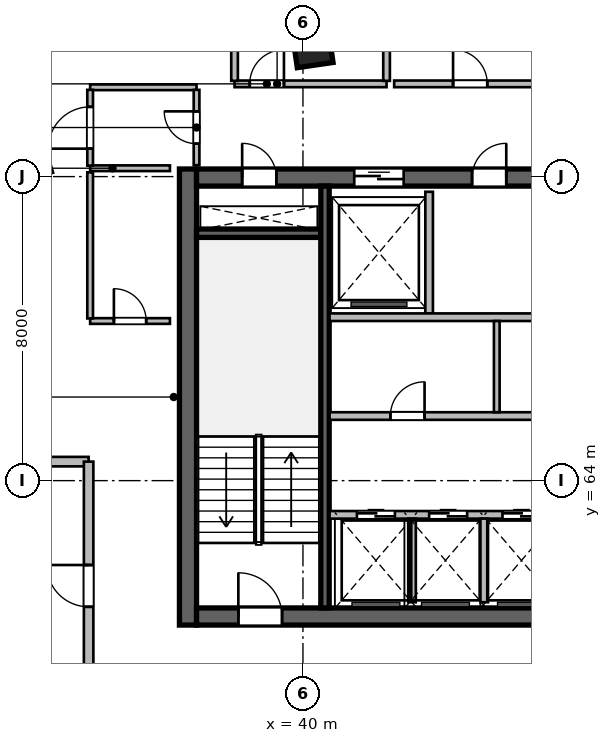
"""IFC4 building model, lengths in metres.
Left out: names, types, materials, properties, quantities, classifications, styles, units other than length and angle.
Written with IfcOpenShell. Run it as: python <this file> out.ifc"""

import sys

from ifc_helpers import new_model, si_unit, direction, frame, frame_2d, origin, origin_2d, place, context, subcontext, project, spatial, rectangle, extrude, source, transform, mapped, element, fill, save


model = new_model("IFC4")
c1 = context("Model", 3, precision=1e-05, world=origin(), true_north=direction((0.0, 1.0)))
c2 = subcontext(c1, "Body", "Model", "MODEL_VIEW")
j1 = project(units=[si_unit("LENGTHUNIT", "METRE"), si_unit("PLANEANGLEUNIT", "RADIAN")], contexts=[c1])
p1 = place(None, origin())
s1 = spatial("IfcSite", under=j1, at=p1, CompositionType="ELEMENT")
p2 = place(p1, origin())
s2 = spatial("IfcBuilding", under=s1, at=p2, CompositionType="ELEMENT")
p3 = place(p2, frame((0.0, 0.0, 231.3)))
s3 = spatial("IfcBuildingStorey", under=s2, at=p3, CompositionType="ELEMENT", Elevation=231.3)
m1 = source(origin(), c2, "Body", "SweptSolid", [
    extrude(rectangle(XDim=12.0, YDim=0.45, at=frame_2d((6.0, 0.0))), origin(), (0.0, 0.0, 1.0), 3.9),
])
p4 = place(p3, frame((36.975, 60.2, 0.0), z_axis=(0.0, 0.0, 1.0), x_axis=(0.0, 1.0, 0.0)))
e1 = element("IfcWall", 1, at=p4, inside=s3, PredefinedType="SHEAR", context=c2, shape_type="MappedRepresentation", body=[
    mapped(m1, transform((0.0, 0.0, 0.0), scale=1.0)),
])
m2 = source(origin(), c2, "Body", "SweptSolid", [
    extrude(rectangle(XDim=21.6, YDim=0.45, at=frame_2d((10.8, 0.0))), origin(), (0.0, 0.0, 1.0), 3.9),
])
p5 = place(p3, frame((37.2, 60.425, 0.0), z_axis=(0.0, 0.0, 1.0), x_axis=(1.0, 0.0, 0.0)))
e2 = element("IfcWall", 2, at=p5, inside=s3, PredefinedType="SHEAR", context=c2, shape_type="MappedRepresentation", body=[
    mapped(m2, transform((0.0, 0.0, 0.0), scale=1.0)),
])
p6 = place(p5, frame((1.1, 0.0, 0.0)))
e3 = element("IfcOpeningElement", 3, at=p6, cuts=e2, PredefinedType="OPENING", context=c2, shape_type="SweptSolid", body=[
    extrude(rectangle(XDim=1.15, YDim=2.15, at=frame_2d((0.575, 1.075))), frame((0.0, 0.235, 0.0), z_axis=(0.0, -1.0, 0.0), x_axis=(1.0, 0.0, 0.0)), (0.0, 0.0, 1.0), 0.47),
])
p7 = place(p5, frame((19.5, 0.0, 0.0)))
e4 = element("IfcOpeningElement", 4, at=p7, cuts=e2, PredefinedType="OPENING", context=c2, shape_type="SweptSolid", body=[
    extrude(rectangle(XDim=0.9, YDim=2.1, at=frame_2d((0.45, 1.05))), frame((0.0, 0.235, 0.0), z_axis=(0.0, -1.0, 0.0), x_axis=(1.0, 0.0, 0.0)), (0.0, 0.0, 1.0), 0.47),
])
p8 = place(p5, frame((12.02, 0.0, 0.0)))
e5 = element("IfcOpeningElement", 5, at=p8, cuts=e2, PredefinedType="OPENING", context=c2, shape_type="SweptSolid", body=[
    extrude(rectangle(XDim=1.6, YDim=2.15, at=frame_2d((0.8, 1.075))), frame((0.0, 0.235, 0.0), z_axis=(0.0, -1.0, 0.0), x_axis=(1.0, 0.0, 0.0)), (0.0, 0.0, 1.0), 0.47),
])
p9 = place(p3, frame((37.2, 71.975, 0.0), z_axis=(0.0, 0.0, 1.0), x_axis=(1.0, 0.0, 0.0)))
e6 = element("IfcWall", 6, at=p9, inside=s3, PredefinedType="SHEAR", context=c2, shape_type="MappedRepresentation", body=[
    mapped(m2, transform((0.0, 0.0, 0.0), scale=1.0)),
])
p10 = place(p9, frame((1.2, 0.0, 0.0)))
e7 = element("IfcOpeningElement", 7, at=p10, cuts=e6, PredefinedType="OPENING", context=c2, shape_type="SweptSolid", body=[
    extrude(rectangle(XDim=0.9, YDim=2.1, at=frame_2d((0.45, 1.05))), frame((0.0, 0.235, 0.0), z_axis=(0.0, -1.0, 0.0), x_axis=(1.0, 0.0, 0.0)), (0.0, 0.0, 1.0), 0.47),
])
p11 = place(p9, frame((14.7, 0.0, 0.0)))
e8 = element("IfcOpeningElement", 8, at=p11, cuts=e6, PredefinedType="OPENING", context=c2, shape_type="SweptSolid", body=[
    extrude(rectangle(XDim=1.2, YDim=2.15, at=frame_2d((0.6, 1.075))), frame((0.0, 0.235, 0.0), z_axis=(0.0, -1.0, 0.0), x_axis=(1.0, 0.0, 0.0)), (0.0, 0.0, 1.0), 0.47),
])
p12 = place(p9, frame((4.15, 0.0, 0.0)))
e9 = element("IfcOpeningElement", 9, at=p12, cuts=e6, PredefinedType="OPENING", context=c2, shape_type="SweptSolid", body=[
    extrude(rectangle(XDim=1.3, YDim=2.15, at=frame_2d((0.65, 1.075))), frame((0.0, 0.235, 0.0), z_axis=(0.0, -1.0, 0.0), x_axis=(1.0, 0.0, 0.0)), (0.0, 0.0, 1.0), 0.47),
])
p13 = place(p9, frame((7.25, 0.0, 0.0)))
e10 = element("IfcOpeningElement", 10, at=p13, cuts=e6, PredefinedType="OPENING", context=c2, shape_type="SweptSolid", body=[
    extrude(rectangle(XDim=0.9, YDim=2.1, at=frame_2d((0.45, 1.05))), frame((0.0, 0.235, 0.0), z_axis=(0.0, -1.0, 0.0), x_axis=(1.0, 0.0, 0.0)), (0.0, 0.0, 1.0), 0.47),
])
p14 = place(p9, frame((10.95, 0.0, 0.0)))
e11 = element("IfcOpeningElement", 11, at=p14, cuts=e6, PredefinedType="OPENING", context=c2, shape_type="SweptSolid", body=[
    extrude(rectangle(XDim=0.9, YDim=2.1, at=frame_2d((0.45, 1.05))), frame((0.0, 0.235, 0.0), z_axis=(0.0, -1.0, 0.0), x_axis=(1.0, 0.0, 0.0)), (0.0, 0.0, 1.0), 0.47),
])
m3 = source(origin(), c2, "Body", "SweptSolid", [
    extrude(rectangle(XDim=3.27, YDim=0.22, at=frame_2d((1.635, 0.0))), origin(), (0.0, 0.0, 1.0), 3.9),
])
p15 = place(p3, frame((37.2, 70.51, 0.0), z_axis=(0.0, 0.0, 1.0), x_axis=(1.0, 0.0, 0.0)))
e12 = element("IfcWall", 12, at=p15, inside=s3, PredefinedType="SHEAR", context=c2, shape_type="MappedRepresentation", body=[
    mapped(m3, transform((0.0, 0.0, 0.0), scale=1.0)),
])
m4 = source(origin(), c2, "Body", "SweptSolid", [
    extrude(rectangle(XDim=11.1, YDim=0.22, at=frame_2d((5.55, 0.0))), origin(), (0.0, 0.0, 1.0), 3.9),
])
p16 = place(p3, frame((40.58, 60.65, 0.0), z_axis=(0.0, 0.0, 1.0), x_axis=(0.0, 1.0, 0.0)))
e13 = element("IfcWall", 13, at=p16, inside=s3, PredefinedType="SHEAR", context=c2, shape_type="MappedRepresentation", body=[
    mapped(m4, transform((0.0, 0.0, 0.0), scale=1.0)),
])
m5 = source(origin(), c2, "Body", "SweptSolid", [
    extrude(rectangle(XDim=0.95, YDim=0.95, at=origin_2d()), origin(), (0.0, 0.0, 1.0), 3.9),
])
p17 = place(p3, frame((40.253, 75.404, 0.0), z_axis=(0.0, 0.0, 1.0), x_axis=(-0.143492621991, 0.98965138682, 0.0)))
e14 = element("IfcColumn", 14, at=p17, inside=s3, PredefinedType="COLUMN", context=c2, shape_type="MappedRepresentation", body=[
    mapped(m5, transform((0.0, 0.0, 0.0), scale=1.0)),
])
m6 = source(origin(), c2, "Body", "SweptSolid", [
    extrude(rectangle(XDim=3.2, YDim=0.2, at=frame_2d((1.6, 0.0))), origin(), (0.0, 0.0, 1.0), 3.65),
])
p18 = place(p3, frame((43.32, 68.4, 0.0), z_axis=(0.0, 0.0, 1.0), x_axis=(0.0, 1.0, 0.0)))
e15 = element("IfcWall", 15, at=p18, inside=s3, PredefinedType="SOLIDWALL", context=c2, shape_type="MappedRepresentation", body=[
    mapped(m6, transform((0.0, 0.0, 0.0), scale=1.0)),
])
m7 = source(origin(), c2, "Body", "SweptSolid", [
    extrude(rectangle(XDim=8.8, YDim=0.2, at=frame_2d((4.4, 0.0))), origin(), (0.0, 0.0, 1.0), 3.65),
])
p19 = place(p3, frame((40.7, 68.3, 0.0), z_axis=(0.0, 0.0, 1.0), x_axis=(1.0, 0.0, 0.0)))
e16 = element("IfcWall", 16, at=p19, inside=s3, PredefinedType="SOLIDWALL", context=c2, shape_type="MappedRepresentation", body=[
    mapped(m7, transform((0.0, 0.0, 0.0), scale=1.0)),
])
m8 = source(origin(), c2, "Body", "SweptSolid", [
    extrude(rectangle(XDim=8.02, YDim=0.2, at=frame_2d((4.01, 0.0))), origin(), (0.0, 0.0, 1.0), 3.65),
])
p20 = place(p3, frame((40.7, 63.1, 0.0), z_axis=(0.0, 0.0, 1.0), x_axis=(1.0, 0.0, 0.0)))
e17 = element("IfcWall", 17, at=p20, inside=s3, PredefinedType="SOLIDWALL", context=c2, shape_type="MappedRepresentation", body=[
    mapped(m8, transform((0.0, 0.0, 0.0), scale=1.0)),
])
p21 = place(p20, frame((0.72, 0.0, 0.0)))
e18 = element("IfcOpeningElement", 18, at=p21, cuts=e17, PredefinedType="OPENING", context=c2, shape_type="SweptSolid", body=[
    extrude(rectangle(XDim=1.0, YDim=2.15, at=frame_2d((0.5, 1.075))), frame((0.0, 0.11, 0.0), z_axis=(0.0, -1.0, 0.0), x_axis=(1.0, 0.0, 0.0)), (0.0, 0.0, 1.0), 0.22),
])
p22 = place(p20, frame((2.62, 0.0, 0.0)))
e19 = element("IfcOpeningElement", 19, at=p22, cuts=e17, PredefinedType="OPENING", context=c2, shape_type="SweptSolid", body=[
    extrude(rectangle(XDim=1.0, YDim=2.15, at=frame_2d((0.5, 1.075))), frame((0.0, 0.11, 0.0), z_axis=(0.0, -1.0, 0.0), x_axis=(1.0, 0.0, 0.0)), (0.0, 0.0, 1.0), 0.22),
])
p23 = place(p20, frame((4.55, 0.0, 0.0)))
e20 = element("IfcOpeningElement", 20, at=p23, cuts=e17, PredefinedType="OPENING", context=c2, shape_type="SweptSolid", body=[
    extrude(rectangle(XDim=1.0, YDim=2.15, at=frame_2d((0.5, 1.075))), frame((0.0, 0.11, 0.0), z_axis=(0.0, -1.0, 0.0), x_axis=(1.0, 0.0, 0.0)), (0.0, 0.0, 1.0), 0.22),
])
p24 = place(p20, frame((6.55, 0.0, 0.0)))
e21 = element("IfcOpeningElement", 21, at=p24, cuts=e17, PredefinedType="OPENING", context=c2, shape_type="SweptSolid", body=[
    extrude(rectangle(XDim=1.0, YDim=2.15, at=frame_2d((0.5, 1.075))), frame((0.0, 0.11, 0.0), z_axis=(0.0, -1.0, 0.0), x_axis=(1.0, 0.0, 0.0)), (0.0, 0.0, 1.0), 0.22),
])
m9 = source(origin(), c2, "Body", "SweptSolid", [
    extrude(rectangle(XDim=2.2, YDim=0.2, at=frame_2d((1.1, 0.0))), origin(), (0.0, 0.0, 1.0), 3.65),
])
for number, where, z_axis, x_axis in (
    (22, (42.87, 60.8, 0.0), (0.0, 0.0, 1.0), (0.0, 1.0, 0.0)),
    (23, (44.77, 60.8, 0.0), (0.0, 0.0, 1.0), (0.0, 1.0, 0.0)),
):
    element("IfcWall", number, at=place(p3, frame(where, z_axis=z_axis, x_axis=x_axis)), inside=s3, PredefinedType="SOLIDWALL", context=c2, shape_type="MappedRepresentation", body=[
        mapped(m9, transform((0.0, 0.0, 0.0), scale=1.0)),
    ])
p25 = place(p3, frame((40.7, 65.7, 0.0), z_axis=(0.0, 0.0, 1.0), x_axis=(1.0, 0.0, 0.0)))
e24 = element("IfcWall", 24, at=p25, inside=s3, PredefinedType="SOLIDWALL", context=c2, shape_type="MappedRepresentation", body=[
    mapped(m7, transform((0.0, 0.0, 0.0), scale=1.0)),
])
p26 = place(p25, frame((1.6, 0.0, 0.0)))
e25 = element("IfcOpeningElement", 25, at=p26, cuts=e24, PredefinedType="OPENING", context=c2, shape_type="SweptSolid", body=[
    extrude(rectangle(XDim=0.9, YDim=2.1, at=frame_2d((0.45, 1.05))), frame((0.0, 0.11, 0.0), z_axis=(0.0, -1.0, 0.0), x_axis=(1.0, 0.0, 0.0)), (0.0, 0.0, 1.0), 0.22),
])
p27 = place(p25, frame((6.1, 0.0, 0.0)))
e26 = element("IfcOpeningElement", 26, at=p27, cuts=e24, PredefinedType="OPENING", context=c2, shape_type="SweptSolid", body=[
    extrude(rectangle(XDim=0.9, YDim=2.1, at=frame_2d((0.45, 1.05))), frame((0.0, 0.11, 0.0), z_axis=(0.0, -1.0, 0.0), x_axis=(1.0, 0.0, 0.0)), (0.0, 0.0, 1.0), 0.22),
])
m10 = source(origin(), c2, "Body", "SweptSolid", [
    extrude(rectangle(XDim=2.4, YDim=0.15, at=frame_2d((1.2, 0.0))), origin(), (0.0, 0.0, 1.0), 3.65),
])
p28 = place(p3, frame((45.1, 65.8, 0.0), z_axis=(0.0, 0.0, 1.0), x_axis=(0.0, 1.0, 0.0)))
e27 = element("IfcWall", 27, at=p28, inside=s3, PredefinedType="PARTITIONING", context=c2, shape_type="MappedRepresentation", body=[
    mapped(m10, transform((0.0, 0.0, 0.0), scale=1.0)),
])
m11 = source(origin(), c2, "Body", "SweptSolid", [
    extrude(rectangle(XDim=2.1, YDim=0.15, at=frame_2d((1.05, 0.0))), origin(), (0.0, 0.0, 1.0), 3.65),
])
p29 = place(p3, frame((34.4, 72.22, 0.0), z_axis=(0.0, 0.0, 1.0), x_axis=(1.0, 0.0, 0.0)))
e28 = element("IfcWall", 28, at=p29, inside=s3, PredefinedType="PARTITIONING", context=c2, shape_type="MappedRepresentation", body=[
    mapped(m11, transform((0.0, 0.0, 0.0), scale=1.0)),
])
m12 = source(origin(), c2, "Body", "SweptSolid", [
    extrude(rectangle(XDim=2.8, YDim=0.15, at=frame_2d((1.4, 0.0))), origin(), (0.0, 0.0, 1.0), 3.65),
])
p30 = place(p3, frame((34.4, 74.35, 0.0), z_axis=(0.0, 0.0, 1.0), x_axis=(1.0, 0.0, 0.0)))
e29 = element("IfcWall", 29, at=p30, inside=s3, PredefinedType="PARTITIONING", context=c2, shape_type="MappedRepresentation", body=[
    mapped(m12, transform((0.0, 0.0, 0.0), scale=1.0)),
])
m13 = source(origin(), c2, "Body", "SweptSolid", [
    extrude(rectangle(XDim=1.995, YDim=0.15, at=frame_2d((0.998, 0.0))), origin(), (0.0, 0.0, 1.0), 3.65),
])
p31 = place(p3, frame((34.4, 72.288, 0.0), z_axis=(0.0, 0.0, 1.0), x_axis=(0.0, 1.0, 0.0)))
e30 = element("IfcWall", 30, at=p31, inside=s3, PredefinedType="PARTITIONING", context=c2, shape_type="MappedRepresentation", body=[
    mapped(m13, transform((0.0, 0.0, 0.0), scale=1.0)),
])
p32 = place(p31, frame((0.448, 0.0, 0.0)))
e31 = element("IfcOpeningElement", 31, at=p32, cuts=e30, PredefinedType="OPENING", context=c2, shape_type="SweptSolid", body=[
    extrude(rectangle(XDim=1.1, YDim=2.15, at=frame_2d((0.55, 1.075))), frame((0.0, 0.085, 0.0), z_axis=(0.0, -1.0, 0.0), x_axis=(1.0, 0.0, 0.0)), (0.0, 0.0, 1.0), 0.17),
])
m14 = source(origin(), c2, "Body", "SweptSolid", [
    extrude(rectangle(XDim=1.982, YDim=0.15, at=frame_2d((0.991, 0.0))), origin(), (0.0, 0.0, 1.0), 3.65),
])
p33 = place(p3, frame((37.2, 72.3, 0.0), z_axis=(0.0, 0.0, 1.0), x_axis=(0.0, 1.0, 0.0)))
e32 = element("IfcWall", 32, at=p33, inside=s3, PredefinedType="PARTITIONING", context=c2, shape_type="MappedRepresentation", body=[
    mapped(m14, transform((0.0, 0.0, 0.0), scale=1.0)),
])
p34 = place(p33, frame((0.566, 0.0, 0.0)))
e33 = element("IfcOpeningElement", 33, at=p34, cuts=e32, PredefinedType="OPENING", context=c2, shape_type="SweptSolid", body=[
    extrude(rectangle(XDim=0.85, YDim=2.1, at=frame_2d((0.425, 1.05))), frame((0.0, 0.085, 0.0), z_axis=(0.0, -1.0, 0.0), x_axis=(1.0, 0.0, 0.0)), (0.0, 0.0, 1.0), 0.17),
])
p35 = place(p3, frame((34.4, 68.2, 0.0), z_axis=(0.0, 0.0, 1.0), x_axis=(1.0, 0.0, 0.0)))
e34 = element("IfcWall", 34, at=p35, inside=s3, PredefinedType="PARTITIONING", context=c2, shape_type="MappedRepresentation", body=[
    mapped(m11, transform((0.0, 0.0, 0.0), scale=1.0)),
])
p36 = place(p35, frame((0.625, 0.0, 0.0)))
e35 = element("IfcOpeningElement", 35, at=p36, cuts=e34, PredefinedType="OPENING", context=c2, shape_type="SweptSolid", body=[
    extrude(rectangle(XDim=0.85, YDim=2.1, at=frame_2d((0.425, 1.05))), frame((0.0, 0.085, 0.0), z_axis=(0.0, -1.0, 0.0), x_axis=(1.0, 0.0, 0.0)), (0.0, 0.0, 1.0), 0.17),
])
m15 = source(origin(), c2, "Body", "SweptSolid", [
    extrude(rectangle(XDim=3.845, YDim=0.15, at=frame_2d((1.922, 0.0))), origin(), (0.0, 0.0, 1.0), 3.65),
])
p37 = place(p3, frame((34.4, 68.268, 0.0), z_axis=(0.0, 0.0, 1.0), x_axis=(0.0, 1.0, 0.0)))
e36 = element("IfcWall", 36, at=p37, inside=s3, PredefinedType="PARTITIONING", context=c2, shape_type="MappedRepresentation", body=[
    mapped(m15, transform((0.0, 0.0, 0.0), scale=1.0)),
])
m16 = source(origin(), c2, "Body", "SweptSolid", [
    extrude(rectangle(XDim=4.0, YDim=0.175, at=frame_2d((2.0, 0.0))), origin(), (0.0, 0.0, 1.0), 3.65),
])
p38 = place(p3, frame((38.2, 74.44, 0.0), z_axis=(0.0, 0.0, 1.0), x_axis=(1.0, 0.0, 0.0)))
e37 = element("IfcWall", 37, at=p38, inside=s3, PredefinedType="PARTITIONING", context=c2, shape_type="MappedRepresentation", body=[
    mapped(m16, transform((0.0, 0.0, 0.0), scale=1.0)),
])
p39 = place(p38, frame((0.4, 0.0, 0.0)))
e38 = element("IfcOpeningElement", 38, at=p39, cuts=e37, PredefinedType="OPENING", context=c2, shape_type="SweptSolid", body=[
    extrude(rectangle(XDim=0.9, YDim=2.08, at=frame_2d((0.45, 1.04))), frame((0.0, 0.098, 0.0), z_axis=(0.0, -1.0, 0.0), x_axis=(1.0, 0.0, 0.0)), (0.0, 0.0, 1.0), 0.195),
])
m17 = source(origin(), c2, "Body", "SweptSolid", [
    extrude(rectangle(XDim=2.403, YDim=0.175, at=frame_2d((1.201, 0.0))), origin(), (0.0, 0.0, 1.0), 3.65),
])
for number, where, z_axis, x_axis in (
    (39, (38.2, 74.519, 0.0), (0.0, 0.0, 1.0), (0.0, 1.0, 0.0)),
    (40, (42.2, 74.519, 0.0), (0.0, 0.0, 1.0), (0.0, 1.0, 0.0)),
):
    element("IfcWall", number, at=place(p3, frame(where, z_axis=z_axis, x_axis=x_axis)), inside=s3, PredefinedType="PARTITIONING", context=c2, shape_type="MappedRepresentation", body=[
        mapped(m17, transform((0.0, 0.0, 0.0), scale=1.0)),
    ])
p40 = place(p3, frame((42.4, 74.44, 0.0), z_axis=(0.0, 0.0, 1.0), x_axis=(1.0, 0.0, 0.0)))
e41 = element("IfcWall", 41, at=p40, inside=s3, PredefinedType="PARTITIONING", context=c2, shape_type="MappedRepresentation", body=[
    mapped(m16, transform((0.0, 0.0, 0.0), scale=1.0)),
])
p41 = place(p40, frame((1.55, 0.0, 0.0)))
e42 = element("IfcOpeningElement", 42, at=p41, cuts=e41, PredefinedType="OPENING", context=c2, shape_type="SweptSolid", body=[
    extrude(rectangle(XDim=0.9, YDim=2.08, at=frame_2d((0.45, 1.04))), frame((0.0, 0.098, 0.0), z_axis=(0.0, -1.0, 0.0), x_axis=(1.0, 0.0, 0.0)), (0.0, 0.0, 1.0), 0.195),
])
m18 = source(origin(), c2, "Body", "SweptSolid", [
    extrude(rectangle(XDim=15.25, YDim=0.25, at=frame_2d((7.625, 0.0))), origin(), (0.0, 0.0, 1.0), 3.65),
])
p42 = place(p3, frame((19.11, 64.5, 0.0), z_axis=(0.0, 0.0, 1.0), x_axis=(1.0, 0.0, 0.0)))
e43 = element("IfcWall", 43, at=p42, inside=s3, PredefinedType="PARTITIONING", context=c2, shape_type="MappedRepresentation", body=[
    mapped(m18, transform((0.0, 0.0, 0.0), scale=1.0)),
])
m19 = source(origin(), c2, "Body", "SweptSolid", [
    extrude(rectangle(XDim=6.54, YDim=0.25, at=frame_2d((3.27, 0.0))), origin(), (0.0, 0.0, 1.0), 3.65),
])
p43 = place(p3, frame((34.36, 57.96, 0.0), z_axis=(0.0, 0.0, 1.0), x_axis=(0.0, 1.0, 0.0)))
e44 = element("IfcWall", 44, at=p43, inside=s3, PredefinedType="PARTITIONING", context=c2, shape_type="MappedRepresentation", body=[
    mapped(m19, transform((0.0, 0.0, 0.0), scale=1.0)),
])
p44 = place(p43, frame((2.72, 0.0, 0.0)))
e45 = element("IfcOpeningElement", 45, at=p44, cuts=e44, PredefinedType="OPENING", context=c2, shape_type="SweptSolid", body=[
    extrude(rectangle(XDim=1.1, YDim=2.15, at=frame_2d((0.55, 1.075))), frame((0.0, 0.135, 0.0), z_axis=(0.0, -1.0, 0.0), x_axis=(1.0, 0.0, 0.0)), (0.0, 0.0, 1.0), 0.27),
])
m20 = source(origin(), c2, "Body", "SweptSolid", [
    extrude(rectangle(XDim=1.15, YDim=2.15, at=frame_2d((0.575, 1.075))), frame((0.0, 0.025, 0.0), z_axis=(0.0, -1.0, 0.0), x_axis=(1.0, 0.0, 0.0)), (0.0, 0.0, 1.0), 0.05),
])
p45 = place(p6, origin())
e46 = element("IfcDoor", 46, at=p45, inside=s3, OperationType="SINGLE_SWING_LEFT", PredefinedType="DOOR", context=c2, shape_type="MappedRepresentation", body=[
    mapped(m20, transform((0.0, 0.0, 0.0), scale=1.0)),
])
fill(e3, e46)
m21 = source(origin(), c2, "Body", "SweptSolid", [
    extrude(rectangle(XDim=0.9, YDim=2.1, at=frame_2d((0.45, 1.05))), frame((0.0, 0.025, 0.0), z_axis=(0.0, -1.0, 0.0), x_axis=(1.0, 0.0, 0.0)), (0.0, 0.0, 1.0), 0.05),
])
p46 = place(p10, origin())
e47 = element("IfcDoor", 47, at=p46, inside=s3, OperationType="SINGLE_SWING_LEFT", PredefinedType="DOOR", context=c2, shape_type="MappedRepresentation", body=[
    mapped(m21, transform((0.0, 0.0, 0.0), scale=1.0)),
])
fill(e7, e47)
m22 = source(origin(), c2, "Body", "SweptSolid", [
    extrude(rectangle(XDim=1.3, YDim=2.15, at=frame_2d((0.65, 1.075))), frame((0.0, 0.025, 0.0), z_axis=(0.0, -1.0, 0.0), x_axis=(1.0, 0.0, 0.0)), (0.0, 0.0, 1.0), 0.05),
])
p47 = place(p12, origin())
e48 = element("IfcDoor", 48, at=p47, inside=s3, OperationType="DOUBLE_DOOR_SLIDING", PredefinedType="DOOR", context=c2, shape_type="MappedRepresentation", body=[
    mapped(m22, transform((0.0, 0.0, 0.0), scale=1.0)),
])
fill(e9, e48)
p48 = place(p13, origin())
e49 = element("IfcDoor", 49, at=p48, inside=s3, OperationType="SINGLE_SWING_RIGHT", PredefinedType="DOOR", context=c2, shape_type="MappedRepresentation", body=[
    mapped(m21, transform((0.0, 0.0, 0.0), scale=1.0)),
])
fill(e10, e49)
m23 = source(origin(), c2, "Body", "SweptSolid", [
    extrude(rectangle(XDim=1.0, YDim=2.15, at=frame_2d((0.5, 1.075))), frame((0.0, 0.025, 0.0), z_axis=(0.0, -1.0, 0.0), x_axis=(1.0, 0.0, 0.0)), (0.0, 0.0, 1.0), 0.05),
])
p49 = place(p21, origin())
e50 = element("IfcDoor", 50, at=p49, inside=s3, OperationType="DOUBLE_DOOR_SLIDING", PredefinedType="DOOR", context=c2, shape_type="MappedRepresentation", body=[
    mapped(m23, transform((0.0, 0.0, 0.0), scale=1.0)),
])
fill(e18, e50)
p50 = place(p22, origin())
e51 = element("IfcDoor", 51, at=p50, inside=s3, OperationType="DOUBLE_DOOR_SLIDING", PredefinedType="DOOR", context=c2, shape_type="MappedRepresentation", body=[
    mapped(m23, transform((0.0, 0.0, 0.0), scale=1.0)),
])
fill(e19, e51)
p51 = place(p23, origin())
e52 = element("IfcDoor", 52, at=p51, inside=s3, OperationType="DOUBLE_DOOR_SLIDING", PredefinedType="DOOR", context=c2, shape_type="MappedRepresentation", body=[
    mapped(m23, transform((0.0, 0.0, 0.0), scale=1.0)),
])
fill(e20, e52)
p52 = place(p26, origin())
e53 = element("IfcDoor", 53, at=p52, inside=s3, OperationType="SINGLE_SWING_RIGHT", PredefinedType="DOOR", context=c2, shape_type="MappedRepresentation", body=[
    mapped(m21, transform((0.0, 0.0, 0.0), scale=1.0)),
])
fill(e25, e53)
m24 = source(origin(), c2, "Body", "SweptSolid", [
    extrude(rectangle(XDim=0.85, YDim=2.1, at=frame_2d((0.425, 1.05))), frame((0.0, 0.025, 0.0), z_axis=(0.0, -1.0, 0.0), x_axis=(1.0, 0.0, 0.0)), (0.0, 0.0, 1.0), 0.05),
])
p53 = place(p34, origin())
e54 = element("IfcDoor", 54, at=p53, inside=s3, OperationType="SINGLE_SWING_RIGHT", PredefinedType="DOOR", context=c2, shape_type="MappedRepresentation", body=[
    mapped(m24, transform((0.0, 0.0, 0.0), scale=1.0)),
])
fill(e33, e54)
p54 = place(p36, origin())
e55 = element("IfcDoor", 55, at=p54, inside=s3, OperationType="SINGLE_SWING_LEFT", PredefinedType="DOOR", context=c2, shape_type="MappedRepresentation", body=[
    mapped(m24, transform((0.0, 0.0, 0.0), scale=1.0)),
])
fill(e35, e55)
m25 = source(origin(), c2, "Body", "SweptSolid", [
    extrude(rectangle(XDim=0.9, YDim=2.08, at=frame_2d((0.45, 1.04))), frame((0.0, 0.025, 0.0), z_axis=(0.0, -1.0, 0.0), x_axis=(1.0, 0.0, 0.0)), (0.0, 0.0, 1.0), 0.05),
])
p55 = place(p39, origin())
e56 = element("IfcDoor", 56, at=p55, inside=s3, OperationType="SINGLE_SWING_RIGHT", PredefinedType="DOOR", context=c2, shape_type="MappedRepresentation", body=[
    mapped(m25, transform((0.0, 0.0, 0.0), scale=1.0)),
])
fill(e38, e56)
p56 = place(p41, origin())
e57 = element("IfcDoor", 57, at=p56, inside=s3, OperationType="SINGLE_SWING_LEFT", PredefinedType="DOOR", context=c2, shape_type="MappedRepresentation", body=[
    mapped(m25, transform((0.0, 0.0, 0.0), scale=1.0)),
])
fill(e42, e57)
m26 = source(origin(), c2, "Body", "SweptSolid", [
    extrude(rectangle(XDim=1.1, YDim=2.15, at=frame_2d((0.55, 1.075))), frame((0.0, 0.025, 0.0), z_axis=(0.0, -1.0, 0.0), x_axis=(1.0, 0.0, 0.0)), (0.0, 0.0, 1.0), 0.05),
])
p57 = place(p44, origin())
e58 = element("IfcDoor", 58, at=p57, inside=s3, OperationType="SINGLE_SWING_RIGHT", PredefinedType="DOOR", context=c2, shape_type="MappedRepresentation", body=[
    mapped(m26, transform((0.0, 0.0, 0.0), scale=1.0)),
])
fill(e45, e58)
p58 = place(p32, origin())
e59 = element("IfcDoor", 59, at=p58, inside=s3, OperationType="SINGLE_SWING_LEFT", PredefinedType="DOOR", context=c2, shape_type="MappedRepresentation", body=[
    mapped(m26, transform((0.0, 0.0, 0.0), scale=1.0)),
])
fill(e31, e59)
save(model, sys.argv[1])
